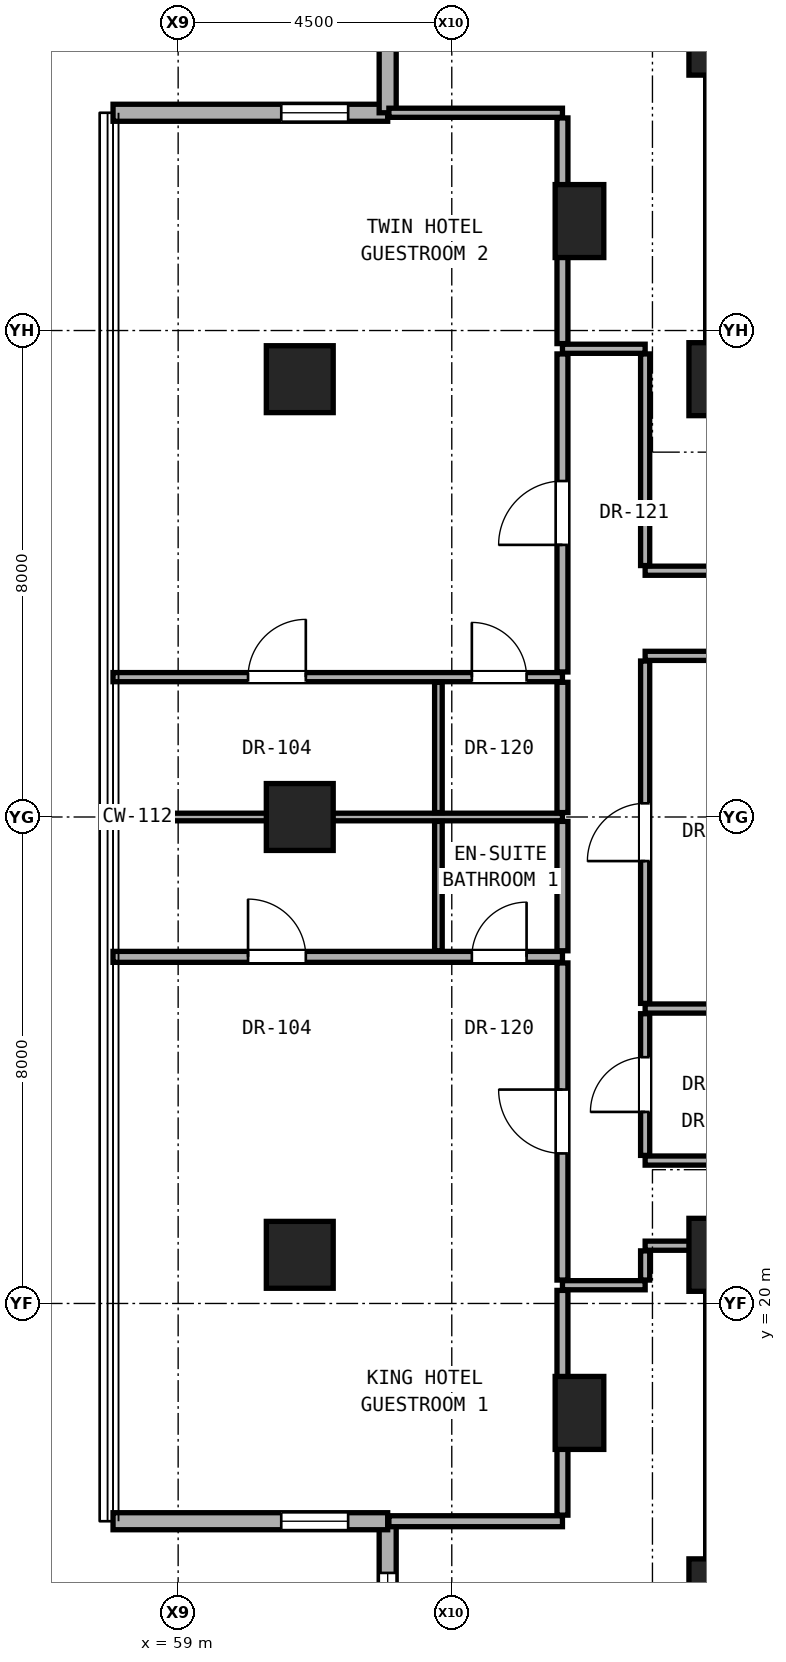
"""IFC4 building model, lengths in metres.
Left out: names, types, materials, properties, quantities, classifications, styles, units other than length and angle.
Written with IfcOpenShell. Run it as: python <this file> out.ifc"""

import sys

from ifc_helpers import new_model, si_unit, direction, frame, frame_2d, origin, origin_2d, place, context, subcontext, project, spatial, rectangle, hollow_rectangle, extrude, element, fill, save


model = new_model("IFC4")
c1 = context("Model", 3, precision=1e-05, world=origin(), true_north=direction((0.0, 1.0)))
c2 = subcontext(c1, "Body", "Model", "MODEL_VIEW")
j1 = project(units=[si_unit("LENGTHUNIT", "METRE"), si_unit("PLANEANGLEUNIT", "RADIAN")], contexts=[c1])
p1 = place(None, origin())
s1 = spatial("IfcSite", under=j1, at=p1, CompositionType="ELEMENT")
p2 = place(p1, origin())
s2 = spatial("IfcBuilding", under=s1, at=p2, CompositionType="ELEMENT")
p3 = place(p2, frame((0.0, 0.0, 108.2)))
s3 = spatial("IfcBuildingStorey", under=s2, at=p3, CompositionType="ELEMENT", Elevation=108.2)
for number, where, z_axis, x_axis in (
    (1, (68.0, 15.2, 0.0), (0.0, 0.0, 1.0), (1.0, 0.0, 0.0)),
    (2, (68.0, 20.8, 0.0), (0.0, 0.0, 1.0), (1.0, 0.0, 0.0)),
    (3, (68.0, 35.2, 0.0), (0.0, 0.0, 1.0), (1.0, 0.0, 0.0)),
    (4, (68.0, 40.8, 0.0), (0.0, 0.0, 1.0), (1.0, 0.0, 0.0)),
):
    element("IfcColumn", number, at=place(p3, frame(where, z_axis=z_axis, x_axis=x_axis)), inside=s3, PredefinedType="COLUMN", context=c2, shape_type="SweptSolid", body=[
        extrude(rectangle(XDim=1.2, YDim=1.2, at=origin_2d()), origin(), (0.0, 0.0, 1.0), 3.3),
    ])
for number, where, z_axis, x_axis in (
    (5, (61.0, 20.8, 0.0), (0.0, 0.0, 1.0), (1.0, 0.0, 0.0)),
    (6, (61.0, 28.0, 0.0), (0.0, 0.0, 1.0), (1.0, 0.0, 0.0)),
    (7, (61.0, 35.2, 0.0), (0.0, 0.0, 1.0), (1.0, 0.0, 0.0)),
):
    element("IfcColumn", number, at=place(p3, frame(where, z_axis=z_axis, x_axis=x_axis)), inside=s3, PredefinedType="COLUMN", context=c2, shape_type="SweptSolid", body=[
        extrude(hollow_rectangle(XDim=1.1, YDim=1.1, WallThickness=0.06, at=origin_2d()), origin(), (0.0, 0.0, 1.0), 3.3),
    ])
for number, where, z_axis, x_axis in (
    (8, (65.6, 18.2, 0.0), (0.0, 0.0, 1.0), (1.0, 0.0, 0.0)),
    (9, (65.6, 37.8, 0.0), (0.0, 0.0, 1.0), (1.0, 0.0, 0.0)),
):
    element("IfcColumn", number, at=place(p3, frame(where, z_axis=z_axis, x_axis=x_axis)), inside=s3, PredefinedType="PILASTER", context=c2, shape_type="SweptSolid", body=[
        extrude(rectangle(XDim=0.8, YDim=1.2, at=origin_2d()), origin(), (0.0, 0.0, 1.0), 3.3),
    ])
for number, where, z_axis, x_axis in (
    (10, (68.0, 35.2, 0.0), (0.0, 0.0, 1.0), (0.0, 1.0, 0.0)),
    (11, (68.0, 15.2, 0.0), (0.0, 0.0, 1.0), (0.0, 1.0, 0.0)),
):
    element("IfcWall", number, at=place(p3, frame(where, z_axis=z_axis, x_axis=x_axis)), inside=s3, PredefinedType="SHEAR", context=c2, shape_type="SweptSolid", body=[
        extrude(rectangle(XDim=5.6, YDim=0.65, at=frame_2d((2.8, 0.0))), origin(), (0.0, 0.0, 1.0), 3.08),
    ])
p4 = place(p3, frame((62.446, 16.419, 0.0), z_axis=(0.0, 0.0, 1.0), x_axis=(0.0, -1.0, 0.0)))
e12 = element("IfcWall", 12, at=p4, inside=s3, PredefinedType="SOLIDWALL", context=c2, shape_type="SweptSolid", body=[
    extrude(rectangle(XDim=4.516, YDim=0.28, at=frame_2d((2.258, 0.0))), origin(), (0.0, 0.0, 1.0), 3.06),
])
p5 = place(p4, frame((0.85, 0.0, 0.81)))
e13 = element("IfcOpeningElement", 13, at=p5, cuts=e12, PredefinedType="OPENING", context=c2, shape_type="SweptSolid", body=[
    extrude(rectangle(XDim=1.8, YDim=2.1, at=frame_2d((0.9, 1.05))), frame((0.0, 0.15, 0.0), z_axis=(0.0, -1.0, 0.0), x_axis=(1.0, 0.0, 0.0)), (0.0, 0.0, 1.0), 0.3),
])
p6 = place(p3, frame((57.929, 16.419, 0.0), z_axis=(0.0, 0.0, 1.0), x_axis=(1.0, 0.0, 0.0)))
e14 = element("IfcWall", 14, at=p6, inside=s3, PredefinedType="SOLIDWALL", context=c2, shape_type="SweptSolid", body=[
    extrude(rectangle(XDim=4.516, YDim=0.28, at=frame_2d((2.258, 0.0))), origin(), (0.0, 0.0, 1.0), 3.06),
])
p7 = place(p6, frame((2.766, 0.0, 0.85)))
e15 = element("IfcOpeningElement", 15, at=p7, cuts=e14, PredefinedType="OPENING", context=c2, shape_type="SweptSolid", body=[
    extrude(rectangle(XDim=1.1, YDim=2.0, at=frame_2d((0.55, 1.0))), frame((0.0, 0.15, 0.0), z_axis=(0.0, -1.0, 0.0), x_axis=(1.0, 0.0, 0.0)), (0.0, 0.0, 1.0), 0.3),
])
p8 = place(p3, frame((62.446, 39.581, 0.0), z_axis=(0.0, 0.0, 1.0), x_axis=(-1.0, 0.0, 0.0)))
e16 = element("IfcWall", 16, at=p8, inside=s3, PredefinedType="SOLIDWALL", context=c2, shape_type="SweptSolid", body=[
    extrude(rectangle(XDim=4.516, YDim=0.28, at=frame_2d((2.258, 0.0))), origin(), (0.0, 0.0, 1.0), 3.06),
])
p9 = place(p8, frame((0.65, 0.0, 0.85)))
e17 = element("IfcOpeningElement", 17, at=p9, cuts=e16, PredefinedType="OPENING", context=c2, shape_type="SweptSolid", body=[
    extrude(rectangle(XDim=1.1, YDim=2.0, at=frame_2d((0.55, 1.0))), frame((0.0, 0.15, 0.0), z_axis=(0.0, -1.0, 0.0), x_axis=(1.0, 0.0, 0.0)), (0.0, 0.0, 1.0), 0.3),
])
p10 = place(p3, frame((62.446, 44.097, 0.0), z_axis=(0.0, 0.0, 1.0), x_axis=(0.0, -1.0, 0.0)))
e18 = element("IfcWall", 18, at=p10, inside=s3, PredefinedType="SOLIDWALL", context=c2, shape_type="SweptSolid", body=[
    extrude(rectangle(XDim=4.516, YDim=0.28, at=frame_2d((2.258, 0.0))), origin(), (0.0, 0.0, 1.0), 3.06),
])
p11 = place(p3, frame((62.466, 16.419, 0.0), z_axis=(0.0, 0.0, 1.0), x_axis=(1.0, 0.0, 0.0)))
e19 = element("IfcWall", 19, at=p11, inside=s3, PredefinedType="PARTITIONING", context=c2, shape_type="SweptSolid", body=[
    extrude(rectangle(XDim=2.854, YDim=0.18, at=frame_2d((1.427, 0.0))), origin(), (0.0, 0.0, 1.0), 3.08),
])
p12 = place(p3, frame((65.32, 20.3, 0.0), z_axis=(0.0, 0.0, 1.0), x_axis=(1.0, 0.0, 0.0)))
e20 = element("IfcWall", 20, at=p12, inside=s3, PredefinedType="PARTITIONING", context=c2, shape_type="SweptSolid", body=[
    extrude(rectangle(XDim=1.36, YDim=0.15, at=frame_2d((0.68, 0.0))), origin(), (0.0, 0.0, 1.0), 3.08),
])
p13 = place(p3, frame((66.68, 20.95, 0.0), z_axis=(0.0, 0.0, 1.0), x_axis=(1.0, 0.0, 0.0)))
e21 = element("IfcWall", 21, at=p13, inside=s3, PredefinedType="PARTITIONING", context=c2, shape_type="SweptSolid", body=[
    extrude(rectangle(XDim=1.0, YDim=0.15, at=frame_2d((0.5, 0.0))), origin(), (0.0, 0.0, 1.0), 2.472),
])
p14 = place(p3, frame((66.68, 22.35, 0.0), z_axis=(0.0, 0.0, 1.0), x_axis=(1.0, 0.0, 0.0)))
e22 = element("IfcWall", 22, at=p14, inside=s3, PredefinedType="PARTITIONING", context=c2, shape_type="SweptSolid", body=[
    extrude(rectangle(XDim=19.5, YDim=0.15, at=frame_2d((9.75, 0.0))), origin(), (0.0, 0.0, 1.0), 2.145),
])
p15 = place(p14, frame((8.053, 0.0, 0.0)))
e23 = element("IfcOpeningElement", 23, at=p15, cuts=e22, PredefinedType="OPENING", context=c2, shape_type="SweptSolid", body=[
    extrude(rectangle(XDim=0.85, YDim=2.01, at=frame_2d((0.425, 1.005))), frame((0.0, 0.085, 0.0), z_axis=(0.0, -1.0, 0.0), x_axis=(1.0, 0.0, 0.0)), (0.0, 0.0, 1.0), 0.17),
])
p16 = place(p3, frame((66.68, 24.85, 0.0), z_axis=(0.0, 0.0, 1.0), x_axis=(1.0, 0.0, 0.0)))
e24 = element("IfcWall", 24, at=p16, inside=s3, PredefinedType="PARTITIONING", context=c2, shape_type="SweptSolid", body=[
    extrude(rectangle(XDim=3.07, YDim=0.15, at=frame_2d((1.535, 0.0))), origin(), (0.0, 0.0, 1.0), 2.145),
])
p17 = place(p3, frame((57.929, 25.7, 0.0), z_axis=(0.0, 0.0, 1.0), x_axis=(1.0, 0.0, 0.0)))
e25 = element("IfcWall", 25, at=p17, inside=s3, PredefinedType="PARTITIONING", context=c2, shape_type="SweptSolid", body=[
    extrude(rectangle(XDim=7.391, YDim=0.18, at=frame_2d((3.696, 0.0))), origin(), (0.0, 0.0, 1.0), 2.216),
])
p18 = place(p17, frame((2.22, 0.0, 0.0)))
e26 = element("IfcOpeningElement", 26, at=p18, cuts=e25, PredefinedType="OPENING", context=c2, shape_type="SweptSolid", body=[
    extrude(rectangle(XDim=0.95, YDim=2.15, at=frame_2d((0.475, 1.075))), frame((0.0, 0.1, 0.0), z_axis=(0.0, -1.0, 0.0), x_axis=(1.0, 0.0, 0.0)), (0.0, 0.0, 1.0), 0.2),
])
p19 = place(p17, frame((5.901, 0.0, 0.0)))
e27 = element("IfcOpeningElement", 27, at=p19, cuts=e25, PredefinedType="OPENING", context=c2, shape_type="SweptSolid", body=[
    extrude(rectangle(XDim=0.9, YDim=2.1, at=frame_2d((0.45, 1.05))), frame((0.0, 0.1, 0.0), z_axis=(0.0, -1.0, 0.0), x_axis=(1.0, 0.0, 0.0)), (0.0, 0.0, 1.0), 0.2),
])
p20 = place(p3, frame((57.929, 28.0, 0.0), z_axis=(0.0, 0.0, 1.0), x_axis=(1.0, 0.0, 0.0)))
e28 = element("IfcWall", 28, at=p20, inside=s3, PredefinedType="PARTITIONING", context=c2, shape_type="SweptSolid", body=[
    extrude(rectangle(XDim=7.391, YDim=0.125, at=frame_2d((3.696, 0.0))), origin(), (0.0, 0.0, 1.0), 2.216),
])
p21 = place(p3, frame((57.929, 30.3, 0.0), z_axis=(0.0, 0.0, 1.0), x_axis=(1.0, 0.0, 0.0)))
e29 = element("IfcWall", 29, at=p21, inside=s3, PredefinedType="PARTITIONING", context=c2, shape_type="SweptSolid", body=[
    extrude(rectangle(XDim=7.391, YDim=0.15, at=frame_2d((3.696, 0.0))), origin(), (0.0, 0.0, 1.0), 2.216),
])
p22 = place(p21, frame((2.22, 0.0, 0.0)))
e30 = element("IfcOpeningElement", 30, at=p22, cuts=e29, PredefinedType="OPENING", context=c2, shape_type="SweptSolid", body=[
    extrude(rectangle(XDim=0.95, YDim=2.15, at=frame_2d((0.475, 1.075))), frame((0.0, 0.085, 0.0), z_axis=(0.0, -1.0, 0.0), x_axis=(1.0, 0.0, 0.0)), (0.0, 0.0, 1.0), 0.17),
])
p23 = place(p21, frame((5.901, 0.0, 0.0)))
e31 = element("IfcOpeningElement", 31, at=p23, cuts=e29, PredefinedType="OPENING", context=c2, shape_type="SweptSolid", body=[
    extrude(rectangle(XDim=0.9, YDim=2.1, at=frame_2d((0.45, 1.05))), frame((0.0, 0.085, 0.0), z_axis=(0.0, -1.0, 0.0), x_axis=(1.0, 0.0, 0.0)), (0.0, 0.0, 1.0), 0.17),
])
p24 = place(p3, frame((66.68, 30.65, 0.0), z_axis=(0.0, 0.0, 1.0), x_axis=(1.0, 0.0, 0.0)))
e32 = element("IfcWall", 32, at=p24, inside=s3, PredefinedType="PARTITIONING", context=c2, shape_type="SweptSolid", body=[
    extrude(rectangle(XDim=19.5, YDim=0.15, at=frame_2d((9.75, 0.0))), origin(), (0.0, 0.0, 1.0), 2.145),
])
p25 = place(p24, frame((3.795, 0.0, 0.0)))
e33 = element("IfcOpeningElement", 33, at=p25, cuts=e32, PredefinedType="OPENING", context=c2, shape_type="SweptSolid", body=[
    extrude(rectangle(XDim=0.85, YDim=2.01, at=frame_2d((0.425, 1.005))), frame((0.0, 0.085, 0.0), z_axis=(0.0, -1.0, 0.0), x_axis=(1.0, 0.0, 0.0)), (0.0, 0.0, 1.0), 0.17),
])
p26 = place(p24, frame((15.098, 0.0, 0.0)))
e34 = element("IfcOpeningElement", 34, at=p26, cuts=e32, PredefinedType="OPENING", context=c2, shape_type="SweptSolid", body=[
    extrude(rectangle(XDim=0.85, YDim=2.01, at=frame_2d((0.425, 1.005))), frame((0.0, 0.085, 0.0), z_axis=(0.0, -1.0, 0.0), x_axis=(1.0, 0.0, 0.0)), (0.0, 0.0, 1.0), 0.17),
])
p27 = place(p3, frame((66.68, 32.05, 0.0), z_axis=(0.0, 0.0, 1.0), x_axis=(1.0, 0.0, 0.0)))
e35 = element("IfcWall", 35, at=p27, inside=s3, PredefinedType="PARTITIONING", context=c2, shape_type="SweptSolid", body=[
    extrude(rectangle(XDim=2.12, YDim=0.15, at=frame_2d((1.06, 0.0))), origin(), (0.0, 0.0, 1.0), 2.145),
])
p28 = place(p3, frame((65.32, 35.7, 0.0), z_axis=(0.0, 0.0, 1.0), x_axis=(1.0, 0.0, 0.0)))
e36 = element("IfcWall", 36, at=p28, inside=s3, PredefinedType="PARTITIONING", context=c2, shape_type="SweptSolid", body=[
    extrude(rectangle(XDim=1.36, YDim=0.15, at=frame_2d((0.68, 0.0))), origin(), (0.0, 0.0, 1.0), 3.08),
])
p29 = place(p3, frame((62.466, 39.581, 0.0), z_axis=(0.0, 0.0, 1.0), x_axis=(1.0, 0.0, 0.0)))
e37 = element("IfcWall", 37, at=p29, inside=s3, PredefinedType="PARTITIONING", context=c2, shape_type="SweptSolid", body=[
    extrude(rectangle(XDim=2.854, YDim=0.15, at=frame_2d((1.427, 0.0))), origin(), (0.0, 0.0, 1.0), 3.08),
])
p30 = place(p3, frame((63.28, 25.8, 0.0), z_axis=(0.0, 0.0, 1.0), x_axis=(0.0, 1.0, 0.0)))
e38 = element("IfcWall", 38, at=p30, inside=s3, PredefinedType="PARTITIONING", context=c2, shape_type="SweptSolid", body=[
    extrude(rectangle(XDim=2.127, YDim=0.125, at=frame_2d((1.064, 0.0))), origin(), (0.0, 0.0, 1.0), 2.299),
])
p31 = place(p3, frame((63.28, 28.073, 0.0), z_axis=(0.0, 0.0, 1.0), x_axis=(0.0, 1.0, 0.0)))
e39 = element("IfcWall", 39, at=p31, inside=s3, PredefinedType="PARTITIONING", context=c2, shape_type="SweptSolid", body=[
    extrude(rectangle(XDim=2.143, YDim=0.125, at=frame_2d((1.071, 0.0))), origin(), (0.0, 0.0, 1.0), 2.299),
])
p32 = place(p3, frame((65.32, 16.519, 0.0), z_axis=(0.0, 0.0, 1.0), x_axis=(0.0, 1.0, 0.0)))
e40 = element("IfcWall", 40, at=p32, inside=s3, PredefinedType="PARTITIONING", context=c2, shape_type="SweptSolid", body=[
    extrude(rectangle(XDim=3.696, YDim=0.18, at=frame_2d((1.848, 0.0))), origin(), (0.0, 0.0, 1.0), 2.456),
])
p33 = place(p3, frame((65.32, 20.385, 0.0), z_axis=(0.0, 0.0, 1.0), x_axis=(0.0, 1.0, 0.0)))
e41 = element("IfcWall", 41, at=p33, inside=s3, PredefinedType="PARTITIONING", context=c2, shape_type="SweptSolid", body=[
    extrude(rectangle(XDim=5.215, YDim=0.18, at=frame_2d((2.607, 0.0))), origin(), (0.0, 0.0, 1.0), 2.472),
])
p34 = place(p33, frame((2.083, 0.0, 0.0)))
e42 = element("IfcOpeningElement", 42, at=p34, cuts=e41, PredefinedType="OPENING", context=c2, shape_type="SweptSolid", body=[
    extrude(rectangle(XDim=1.05, YDim=2.2, at=frame_2d((0.525, 1.1))), frame((0.0, 0.1, 0.0), z_axis=(0.0, -1.0, 0.0), x_axis=(1.0, 0.0, 0.0)), (0.0, 0.0, 1.0), 0.2),
])
p35 = place(p3, frame((65.32, 25.8, 0.0), z_axis=(0.0, 0.0, 1.0), x_axis=(0.0, 1.0, 0.0)))
e43 = element("IfcWall", 43, at=p35, inside=s3, PredefinedType="PARTITIONING", context=c2, shape_type="SweptSolid", body=[
    extrude(rectangle(XDim=2.127, YDim=0.18, at=frame_2d((1.064, 0.0))), origin(), (0.0, 0.0, 1.0), 2.299),
])
p36 = place(p3, frame((65.32, 28.073, 0.0), z_axis=(0.0, 0.0, 1.0), x_axis=(0.0, 1.0, 0.0)))
e44 = element("IfcWall", 44, at=p36, inside=s3, PredefinedType="PARTITIONING", context=c2, shape_type="SweptSolid", body=[
    extrude(rectangle(XDim=2.143, YDim=0.18, at=frame_2d((1.071, 0.0))), origin(), (0.0, 0.0, 1.0), 2.299),
])
p37 = place(p3, frame((65.32, 30.385, 0.0), z_axis=(0.0, 0.0, 1.0), x_axis=(0.0, 1.0, 0.0)))
e45 = element("IfcWall", 45, at=p37, inside=s3, PredefinedType="PARTITIONING", context=c2, shape_type="SweptSolid", body=[
    extrude(rectangle(XDim=5.23, YDim=0.18, at=frame_2d((2.615, 0.0))), origin(), (0.0, 0.0, 1.0), 2.472),
])
p38 = place(p37, frame((2.09, 0.0, 0.0)))
e46 = element("IfcOpeningElement", 46, at=p38, cuts=e45, PredefinedType="OPENING", context=c2, shape_type="SweptSolid", body=[
    extrude(rectangle(XDim=1.05, YDim=2.2, at=frame_2d((0.525, 1.1))), frame((0.0, 0.1, 0.0), z_axis=(0.0, -1.0, 0.0), x_axis=(1.0, 0.0, 0.0)), (0.0, 0.0, 1.0), 0.2),
])
p39 = place(p3, frame((65.32, 35.785, 0.0), z_axis=(0.0, 0.0, 1.0), x_axis=(0.0, 1.0, 0.0)))
e47 = element("IfcWall", 47, at=p39, inside=s3, PredefinedType="PARTITIONING", context=c2, shape_type="SweptSolid", body=[
    extrude(rectangle(XDim=3.711, YDim=0.18, at=frame_2d((1.855, 0.0))), origin(), (0.0, 0.0, 1.0), 2.456),
])
p40 = place(p3, frame((66.68, 20.385, 0.0), z_axis=(0.0, 0.0, 1.0), x_axis=(0.0, 1.0, 0.0)))
e48 = element("IfcWall", 48, at=p40, inside=s3, PredefinedType="PARTITIONING", context=c2, shape_type="SweptSolid", body=[
    extrude(rectangle(XDim=0.48, YDim=0.15, at=frame_2d((0.24, 0.0))), origin(), (0.0, 0.0, 1.0), 2.472),
])
p41 = place(p3, frame((66.68, 22.435, 0.0), z_axis=(0.0, 0.0, 1.0), x_axis=(0.0, 1.0, 0.0)))
e49 = element("IfcWall", 49, at=p41, inside=s3, PredefinedType="PARTITIONING", context=c2, shape_type="SweptSolid", body=[
    extrude(rectangle(XDim=2.33, YDim=0.15, at=frame_2d((1.165, 0.0))), origin(), (0.0, 0.0, 1.0), 3.08),
])
p42 = place(p41, frame((0.715, 0.0, 0.0)))
e50 = element("IfcOpeningElement", 50, at=p42, cuts=e49, PredefinedType="OPENING", context=c2, shape_type="SweptSolid", body=[
    extrude(rectangle(XDim=0.9, YDim=2.1, at=frame_2d((0.45, 1.05))), frame((0.0, 0.085, 0.0), z_axis=(0.0, -1.0, 0.0), x_axis=(1.0, 0.0, 0.0)), (0.0, 0.0, 1.0), 0.17),
])
p43 = place(p3, frame((66.68, 24.935, 0.0), z_axis=(0.0, 0.0, 1.0), x_axis=(0.0, 1.0, 0.0)))
e51 = element("IfcWall", 51, at=p43, inside=s3, PredefinedType="PARTITIONING", context=c2, shape_type="SweptSolid", body=[
    extrude(rectangle(XDim=5.63, YDim=0.15, at=frame_2d((2.815, 0.0))), origin(), (0.0, 0.0, 1.0), 2.299),
])
p44 = place(p43, frame((2.34, 0.0, 0.0)))
e52 = element("IfcOpeningElement", 52, at=p44, cuts=e51, PredefinedType="OPENING", context=c2, shape_type="SweptSolid", body=[
    extrude(rectangle(XDim=0.95, YDim=2.15, at=frame_2d((0.475, 1.075))), frame((0.0, 0.085, 0.0), z_axis=(0.0, -1.0, 0.0), x_axis=(1.0, 0.0, 0.0)), (0.0, 0.0, 1.0), 0.17),
])
p45 = place(p3, frame((66.68, 32.135, 0.0), z_axis=(0.0, 0.0, 1.0), x_axis=(0.0, 1.0, 0.0)))
e53 = element("IfcWall", 53, at=p45, inside=s3, PredefinedType="PARTITIONING", context=c2, shape_type="SweptSolid", body=[
    extrude(rectangle(XDim=3.48, YDim=0.15, at=frame_2d((1.74, 0.0))), origin(), (0.0, 0.0, 1.0), 2.472),
])
p46 = place(p5, origin())
e54 = element("IfcWindow", 54, at=p46, inside=s3, PartitioningType="SINGLE_PANEL", PredefinedType="WINDOW", context=c2, shape_type="SweptSolid", body=[
    extrude(rectangle(XDim=1.8, YDim=2.1, at=frame_2d((0.9, 1.05))), frame((0.0, 0.03, 0.0), z_axis=(0.0, -1.0, 0.0), x_axis=(1.0, 0.0, 0.0)), (0.0, 0.0, 1.0), 0.06),
])
fill(e13, e54)
p47 = place(p7, origin())
e55 = element("IfcWindow", 55, at=p47, inside=s3, PartitioningType="SINGLE_PANEL", PredefinedType="WINDOW", context=c2, shape_type="SweptSolid", body=[
    extrude(rectangle(XDim=1.1, YDim=2.0, at=frame_2d((0.55, 1.0))), frame((0.0, 0.03, 0.0), z_axis=(0.0, -1.0, 0.0), x_axis=(1.0, 0.0, 0.0)), (0.0, 0.0, 1.0), 0.06),
])
fill(e15, e55)
p48 = place(p9, origin())
e56 = element("IfcWindow", 56, at=p48, inside=s3, PartitioningType="SINGLE_PANEL", PredefinedType="WINDOW", context=c2, shape_type="SweptSolid", body=[
    extrude(rectangle(XDim=1.1, YDim=2.0, at=frame_2d((0.55, 1.0))), frame((0.0, 0.03, 0.0), z_axis=(0.0, -1.0, 0.0), x_axis=(1.0, 0.0, 0.0)), (0.0, 0.0, 1.0), 0.06),
])
fill(e17, e56)
p49 = place(p42, origin())
e57 = element("IfcDoor", 57, at=p49, inside=s3, OperationType="SINGLE_SWING_LEFT", PredefinedType="DOOR", context=c2, shape_type="SweptSolid", body=[
    extrude(rectangle(XDim=0.9, YDim=2.1, at=frame_2d((0.45, 1.05))), frame((0.0, 0.025, 0.0), z_axis=(0.0, -1.0, 0.0), x_axis=(1.0, 0.0, 0.0)), (0.0, 0.0, 1.0), 0.05),
])
fill(e50, e57)
p50 = place(p34, origin())
e58 = element("IfcDoor", 58, at=p50, inside=s3, OperationType="SINGLE_SWING_RIGHT", PredefinedType="DOOR", context=c2, shape_type="SweptSolid", body=[
    extrude(rectangle(XDim=1.05, YDim=2.2, at=frame_2d((0.525, 1.1))), frame((0.0, 0.025, 0.0), z_axis=(0.0, -1.0, 0.0), x_axis=(1.0, 0.0, 0.0)), (0.0, 0.0, 1.0), 0.05),
])
fill(e42, e58)
p51 = place(p18, origin())
e59 = element("IfcDoor", 59, at=p51, inside=s3, OperationType="SINGLE_SWING_LEFT", PredefinedType="DOOR", context=c2, shape_type="SweptSolid", body=[
    extrude(rectangle(XDim=0.95, YDim=2.15, at=frame_2d((0.475, 1.075))), frame((0.0, 0.025, 0.0), z_axis=(0.0, -1.0, 0.0), x_axis=(1.0, 0.0, 0.0)), (0.0, 0.0, 1.0), 0.05),
])
fill(e26, e59)
p52 = place(p19, origin())
e60 = element("IfcDoor", 60, at=p52, inside=s3, OperationType="SINGLE_SWING_RIGHT", PredefinedType="DOOR", context=c2, shape_type="SweptSolid", body=[
    extrude(rectangle(XDim=0.9, YDim=2.1, at=frame_2d((0.45, 1.05))), frame((0.0, 0.025, 0.0), z_axis=(0.0, -1.0, 0.0), x_axis=(1.0, 0.0, 0.0)), (0.0, 0.0, 1.0), 0.05),
])
fill(e27, e60)
p53 = place(p38, origin())
e61 = element("IfcDoor", 61, at=p53, inside=s3, OperationType="SINGLE_SWING_LEFT", PredefinedType="DOOR", context=c2, shape_type="SweptSolid", body=[
    extrude(rectangle(XDim=1.05, YDim=2.2, at=frame_2d((0.525, 1.1))), frame((0.0, 0.025, 0.0), z_axis=(0.0, -1.0, 0.0), x_axis=(1.0, 0.0, 0.0)), (0.0, 0.0, 1.0), 0.05),
])
fill(e46, e61)
p54 = place(p22, origin())
e62 = element("IfcDoor", 62, at=p54, inside=s3, OperationType="SINGLE_SWING_RIGHT", PredefinedType="DOOR", context=c2, shape_type="SweptSolid", body=[
    extrude(rectangle(XDim=0.95, YDim=2.15, at=frame_2d((0.475, 1.075))), frame((0.0, 0.025, 0.0), z_axis=(0.0, -1.0, 0.0), x_axis=(1.0, 0.0, 0.0)), (0.0, 0.0, 1.0), 0.05),
])
fill(e30, e62)
p55 = place(p23, origin())
e63 = element("IfcDoor", 63, at=p55, inside=s3, OperationType="SINGLE_SWING_LEFT", PredefinedType="DOOR", context=c2, shape_type="SweptSolid", body=[
    extrude(rectangle(XDim=0.9, YDim=2.1, at=frame_2d((0.45, 1.05))), frame((0.0, 0.025, 0.0), z_axis=(0.0, -1.0, 0.0), x_axis=(1.0, 0.0, 0.0)), (0.0, 0.0, 1.0), 0.05),
])
fill(e31, e63)
p56 = place(p44, origin())
e64 = element("IfcDoor", 64, at=p56, inside=s3, OperationType="SINGLE_SWING_LEFT", PredefinedType="DOOR", context=c2, shape_type="SweptSolid", body=[
    extrude(rectangle(XDim=0.95, YDim=2.15, at=frame_2d((0.475, 1.075))), frame((0.0, 0.025, 0.0), z_axis=(0.0, -1.0, 0.0), x_axis=(1.0, 0.0, 0.0)), (0.0, 0.0, 1.0), 0.05),
])
fill(e52, e64)
save(model, sys.argv[1])
